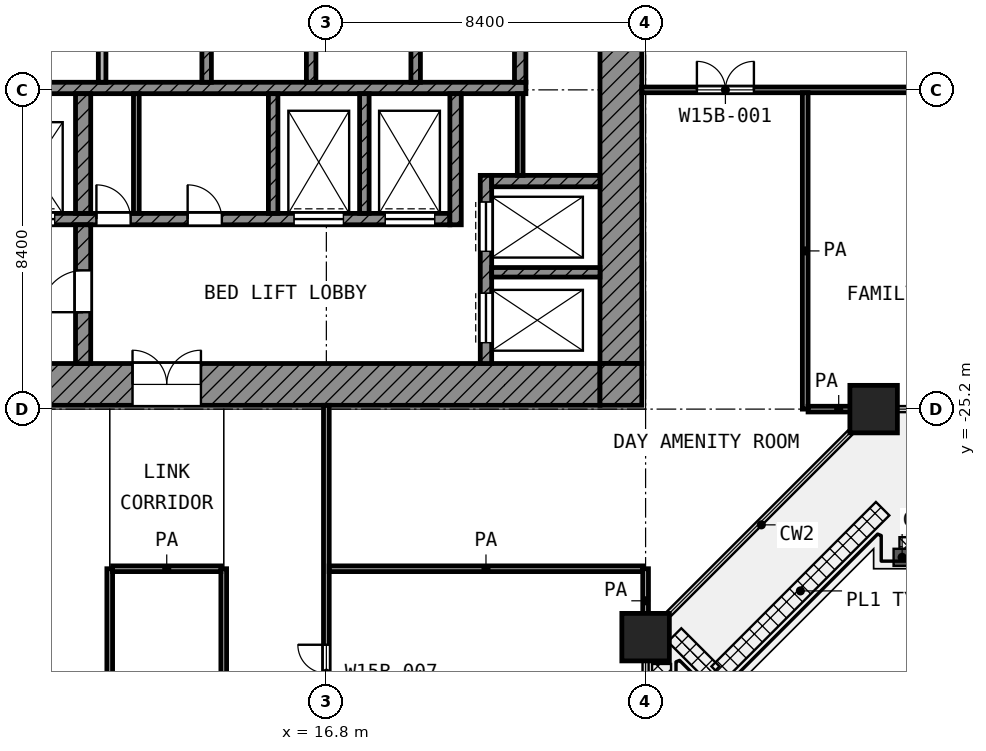
"""IFC4 building model, lengths in metres.
Left out: names, types, materials, properties, quantities, classifications, styles, units other than length and angle.
Written with IfcOpenShell. Run it as: python <this file> out.ifc"""

import sys

from ifc_helpers import new_model, si_unit, direction, frame, frame_2d, origin, origin_2d, place, context, subcontext, project, spatial, rectangle, extrude, element, fill, save


model = new_model("IFC4")
c1 = context("Model", 3, precision=1e-05, world=origin(), true_north=direction((0.0, 1.0)))
c2 = subcontext(c1, "Body", "Model", "MODEL_VIEW")
j1 = project(units=[si_unit("LENGTHUNIT", "METRE"), si_unit("PLANEANGLEUNIT", "RADIAN")], contexts=[c1])
p1 = place(None, origin())
s1 = spatial("IfcSite", under=j1, at=p1, CompositionType="ELEMENT")
p2 = place(p1, origin())
s2 = spatial("IfcBuilding", under=s1, at=p2, CompositionType="ELEMENT")
p3 = place(p2, frame((0.0, 0.0, 85.4)))
s3 = spatial("IfcBuildingStorey", under=s2, at=p3, CompositionType="ELEMENT", Elevation=85.4)
for number, where, z_axis, x_axis in (
    (1, (31.2, -25.2, 0.0), (0.0, 0.0, 1.0), (1.0, 0.0, 0.0)),
    (2, (25.2, -31.2, 0.0), (0.0, 0.0, 1.0), (1.0, 0.0, 0.0)),
):
    element("IfcColumn", number, at=place(p3, frame(where, z_axis=z_axis, x_axis=x_axis)), inside=s3, PredefinedType="COLUMN", context=c2, shape_type="SweptSolid", body=[
        extrude(rectangle(XDim=1.25, YDim=1.25, at=origin_2d()), origin(), (0.0, 0.0, 1.0), 4.2),
    ])
p4 = place(p3, frame((24.55, -24.0, 0.0), z_axis=(0.0, 0.0, 1.0), x_axis=(0.0, 1.0, 0.0)))
e3 = element("IfcWall", 3, at=p4, inside=s3, PredefinedType="SHEAR", context=c2, shape_type="SweptSolid", body=[
    extrude(rectangle(XDim=18.6, YDim=1.1, at=frame_2d((9.3, 0.0))), origin(), (0.0, 0.0, 1.0), 3.9),
])
p5 = place(p4, frame((10.5, 0.0, 0.0)))
e4 = element("IfcOpeningElement", 4, at=p5, cuts=e3, PredefinedType="OPENING", context=c2, shape_type="SweptSolid", body=[
    extrude(rectangle(XDim=1.8, YDim=2.1, at=frame_2d((0.9, 1.05))), frame((0.0, 0.56, 0.0), z_axis=(0.0, -1.0, 0.0), x_axis=(1.0, 0.0, 0.0)), (0.0, 0.0, 1.0), 1.12),
])
p6 = place(p3, frame((5.4, -24.55, 0.0), z_axis=(0.0, 0.0, 1.0), x_axis=(1.0, 0.0, 0.0)))
e5 = element("IfcWall", 5, at=p6, inside=s3, PredefinedType="SHEAR", context=c2, shape_type="SweptSolid", body=[
    extrude(rectangle(XDim=18.6, YDim=1.1, at=frame_2d((9.3, 0.0))), origin(), (0.0, 0.0, 1.0), 3.9),
])
p7 = place(p6, frame((6.3, 0.0, 0.0)))
e6 = element("IfcOpeningElement", 6, at=p7, cuts=e5, PredefinedType="OPENING", context=c2, shape_type="SweptSolid", body=[
    extrude(rectangle(XDim=1.8, YDim=2.1, at=frame_2d((0.9, 1.05))), frame((0.0, 0.56, 0.0), z_axis=(0.0, -1.0, 0.0), x_axis=(1.0, 0.0, 0.0)), (0.0, 0.0, 1.0), 1.12),
])
p8 = place(p3, frame((24.55, -25.1, 0.0), z_axis=(0.0, 0.0, 1.0), x_axis=(0.0, 1.0, 0.0)))
e7 = element("IfcWall", 7, at=p8, inside=s3, PredefinedType="SHEAR", context=c2, shape_type="SweptSolid", body=[
    extrude(rectangle(XDim=1.1, YDim=1.1, at=frame_2d((0.55, 0.0))), origin(), (0.0, 0.0, 1.0), 3.9),
])
p9 = place(p3, frame((5.4, -16.75, 0.0), z_axis=(0.0, 0.0, 1.0), x_axis=(1.0, 0.0, 0.0)))
e8 = element("IfcWall", 8, at=p9, inside=s3, PredefinedType="SHEAR", context=c2, shape_type="SweptSolid", body=[
    extrude(rectangle(XDim=16.65, YDim=0.3, at=frame_2d((8.325, 0.0))), origin(), (0.0, 0.0, 1.0), 3.9),
])
p10 = place(p3, frame((5.4, -20.2, 0.0), z_axis=(0.0, 0.0, 1.0), x_axis=(1.0, 0.0, 0.0)))
e9 = element("IfcWall", 9, at=p10, inside=s3, PredefinedType="SHEAR", context=c2, shape_type="SweptSolid", body=[
    extrude(rectangle(XDim=14.65, YDim=0.3, at=frame_2d((7.325, 0.0))), origin(), (0.0, 0.0, 1.0), 3.9),
])
p11 = place(p10, frame((10.55, 0.0, 0.0)))
e10 = element("IfcOpeningElement", 10, at=p11, cuts=e9, PredefinedType="OPENING", context=c2, shape_type="SweptSolid", body=[
    extrude(rectangle(XDim=1.3, YDim=2.1, at=frame_2d((0.65, 1.05))), frame((0.0, 0.16, 0.0), z_axis=(0.0, -1.0, 0.0), x_axis=(1.0, 0.0, 0.0)), (0.0, 0.0, 1.0), 0.32),
])
p12 = place(p10, frame((12.95, 0.0, 0.0)))
e11 = element("IfcOpeningElement", 11, at=p12, cuts=e9, PredefinedType="OPENING", context=c2, shape_type="SweptSolid", body=[
    extrude(rectangle(XDim=1.3, YDim=2.1, at=frame_2d((0.65, 1.05))), frame((0.0, 0.16, 0.0), z_axis=(0.0, -1.0, 0.0), x_axis=(1.0, 0.0, 0.0)), (0.0, 0.0, 1.0), 0.32),
])
p13 = place(p10, frame((0.55, 0.0, 0.0)))
e12 = element("IfcOpeningElement", 12, at=p13, cuts=e9, PredefinedType="OPENING", context=c2, shape_type="SweptSolid", body=[
    extrude(rectangle(XDim=1.3, YDim=2.1, at=frame_2d((0.65, 1.05))), frame((0.0, 0.16, 0.0), z_axis=(0.0, -1.0, 0.0), x_axis=(1.0, 0.0, 0.0)), (0.0, 0.0, 1.0), 0.32),
])
p14 = place(p10, frame((2.95, 0.0, 0.0)))
e13 = element("IfcOpeningElement", 13, at=p14, cuts=e9, PredefinedType="OPENING", context=c2, shape_type="SweptSolid", body=[
    extrude(rectangle(XDim=1.3, YDim=2.1, at=frame_2d((0.65, 1.05))), frame((0.0, 0.16, 0.0), z_axis=(0.0, -1.0, 0.0), x_axis=(1.0, 0.0, 0.0)), (0.0, 0.0, 1.0), 0.32),
])
p15 = place(p10, frame((5.35, 0.0, 0.0)))
e14 = element("IfcOpeningElement", 14, at=p15, cuts=e9, PredefinedType="OPENING", context=c2, shape_type="SweptSolid", body=[
    extrude(rectangle(XDim=0.9, YDim=2.1, at=frame_2d((0.45, 1.05))), frame((0.0, 0.16, 0.0), z_axis=(0.0, -1.0, 0.0), x_axis=(1.0, 0.0, 0.0)), (0.0, 0.0, 1.0), 0.32),
])
p16 = place(p10, frame((7.75, 0.0, 0.0)))
e15 = element("IfcOpeningElement", 15, at=p16, cuts=e9, PredefinedType="OPENING", context=c2, shape_type="SweptSolid", body=[
    extrude(rectangle(XDim=0.9, YDim=2.1, at=frame_2d((0.45, 1.05))), frame((0.0, 0.16, 0.0), z_axis=(0.0, -1.0, 0.0), x_axis=(1.0, 0.0, 0.0)), (0.0, 0.0, 1.0), 0.32),
])
p17 = place(p3, frame((10.4, -24.0, 0.0), z_axis=(0.0, 0.0, 1.0), x_axis=(0.0, 1.0, 0.0)))
e16 = element("IfcWall", 16, at=p17, inside=s3, PredefinedType="SHEAR", context=c2, shape_type="SweptSolid", body=[
    extrude(rectangle(XDim=3.65, YDim=0.4, at=frame_2d((1.825, 0.0))), origin(), (0.0, 0.0, 1.0), 3.9),
])
p18 = place(p17, frame((1.35, 0.0, 0.0)))
e17 = element("IfcOpeningElement", 17, at=p18, cuts=e16, PredefinedType="OPENING", context=c2, shape_type="SweptSolid", body=[
    extrude(rectangle(XDim=1.1, YDim=2.1, at=frame_2d((0.55, 1.05))), frame((0.0, 0.21, 0.0), z_axis=(0.0, -1.0, 0.0), x_axis=(1.0, 0.0, 0.0)), (0.0, 0.0, 1.0), 0.42),
])
p19 = place(p3, frame((10.4, -20.05, 0.0), z_axis=(0.0, 0.0, 1.0), x_axis=(0.0, 1.0, 0.0)))
e18 = element("IfcWall", 18, at=p19, inside=s3, PredefinedType="SHEAR", context=c2, shape_type="SweptSolid", body=[
    extrude(rectangle(XDim=3.15, YDim=0.4, at=frame_2d((1.575, 0.0))), origin(), (0.0, 0.0, 1.0), 3.9),
])
p20 = place(p3, frame((20.2, -20.35, 0.0), z_axis=(0.0, 0.0, 1.0), x_axis=(0.0, 1.0, 0.0)))
e19 = element("IfcWall", 19, at=p20, inside=s3, PredefinedType="SHEAR", context=c2, shape_type="SweptSolid", body=[
    extrude(rectangle(XDim=3.45, YDim=0.3, at=frame_2d((1.725, 0.0))), origin(), (0.0, 0.0, 1.0), 3.9),
])
p21 = place(p3, frame((21.9, -16.6, 0.0), z_axis=(0.0, 0.0, 1.0), x_axis=(0.0, 1.0, 0.0)))
e20 = element("IfcWall", 20, at=p21, inside=s3, PredefinedType="SHEAR", context=c2, shape_type="SweptSolid", body=[
    extrude(rectangle(XDim=2.35, YDim=0.3, at=frame_2d((1.175, 0.0))), origin(), (0.0, 0.0, 1.0), 3.9),
])
p22 = place(p3, frame((21.15, -19.2, 0.0), z_axis=(0.0, 0.0, 1.0), x_axis=(1.0, 0.0, 0.0)))
e21 = element("IfcWall", 21, at=p22, inside=s3, PredefinedType="SHEAR", context=c2, shape_type="SweptSolid", body=[
    extrude(rectangle(XDim=2.85, YDim=0.3, at=frame_2d((1.425, 0.0))), origin(), (0.0, 0.0, 1.0), 3.9),
])
p23 = place(p3, frame((21.0, -24.0, 0.0), z_axis=(0.0, 0.0, 1.0), x_axis=(0.0, 1.0, 0.0)))
e22 = element("IfcWall", 22, at=p23, inside=s3, PredefinedType="SHEAR", context=c2, shape_type="SweptSolid", body=[
    extrude(rectangle(XDim=4.95, YDim=0.3, at=frame_2d((2.475, 0.0))), origin(), (0.0, 0.0, 1.0), 3.9),
])
p24 = place(p23, frame((2.95, 0.0, 0.0)))
e23 = element("IfcOpeningElement", 23, at=p24, cuts=e22, PredefinedType="OPENING", context=c2, shape_type="SweptSolid", body=[
    extrude(rectangle(XDim=1.3, YDim=2.1, at=frame_2d((0.65, 1.05))), frame((0.0, 0.16, 0.0), z_axis=(0.0, -1.0, 0.0), x_axis=(1.0, 0.0, 0.0)), (0.0, 0.0, 1.0), 0.32),
])
p25 = place(p23, frame((0.55, 0.0, 0.0)))
e24 = element("IfcOpeningElement", 24, at=p25, cuts=e22, PredefinedType="OPENING", context=c2, shape_type="SweptSolid", body=[
    extrude(rectangle(XDim=1.3, YDim=2.1, at=frame_2d((0.65, 1.05))), frame((0.0, 0.16, 0.0), z_axis=(0.0, -1.0, 0.0), x_axis=(1.0, 0.0, 0.0)), (0.0, 0.0, 1.0), 0.32),
])
p26 = place(p3, frame((21.15, -21.6, 0.0), z_axis=(0.0, 0.0, 1.0), x_axis=(1.0, 0.0, 0.0)))
e25 = element("IfcWall", 25, at=p26, inside=s3, PredefinedType="SHEAR", context=c2, shape_type="SweptSolid", body=[
    extrude(rectangle(XDim=2.85, YDim=0.25, at=frame_2d((1.425, 0.0))), origin(), (0.0, 0.0, 1.0), 3.9),
])
for number, where, z_axis, x_axis in (
    (26, (15.4, -20.05, 0.0), (0.0, 0.0, 1.0), (0.0, 1.0, 0.0)),
    (27, (17.8, -20.05, 0.0), (0.0, 0.0, 1.0), (0.0, 1.0, 0.0)),
):
    element("IfcWall", number, at=place(p3, frame(where, z_axis=z_axis, x_axis=x_axis)), inside=s3, PredefinedType="SHEAR", context=c2, shape_type="SweptSolid", body=[
        extrude(rectangle(XDim=3.15, YDim=0.25, at=frame_2d((1.575, 0.0))), origin(), (0.0, 0.0, 1.0), 3.9),
    ])
p27 = place(p3, frame((10.9, -16.6, 0.0), z_axis=(0.0, 0.0, 1.0), x_axis=(0.0, 1.0, 0.0)))
e28 = element("IfcWall", 28, at=p27, inside=s3, PredefinedType="PARTITIONING", context=c2, shape_type="SweptSolid", body=[
    extrude(rectangle(XDim=2.35, YDim=0.2, at=frame_2d((1.175, 0.0))), origin(), (0.0, 0.0, 1.0), 3.9),
])
for number, where, z_axis, x_axis in (
    (29, (13.65, -16.6, 0.0), (0.0, 0.0, 1.0), (0.0, 1.0, 0.0)),
    (30, (16.4, -16.6, 0.0), (0.0, 0.0, 1.0), (0.0, 1.0, 0.0)),
    (31, (19.15, -16.6, 0.0), (0.0, 0.0, 1.0), (0.0, 1.0, 0.0)),
):
    element("IfcWall", number, at=place(p3, frame(where, z_axis=z_axis, x_axis=x_axis)), inside=s3, PredefinedType="SHEAR", context=c2, shape_type="SweptSolid", body=[
        extrude(rectangle(XDim=2.35, YDim=0.25, at=frame_2d((1.175, 0.0))), origin(), (0.0, 0.0, 1.0), 3.9),
    ])
p28 = place(p3, frame((21.9, -19.05, 0.0), z_axis=(0.0, 0.0, 1.0), x_axis=(0.0, 1.0, 0.0)))
e32 = element("IfcWall", 32, at=p28, inside=s3, PredefinedType="PARTITIONING", context=c2, shape_type="SweptSolid", body=[
    extrude(rectangle(XDim=2.15, YDim=0.15, at=frame_2d((1.075, 0.0))), origin(), (0.0, 0.0, 1.0), 3.9),
])
p29 = place(p3, frame((11.8, -20.05, 0.0), z_axis=(0.0, 0.0, 1.0), x_axis=(0.0, 1.0, 0.0)))
e33 = element("IfcWall", 33, at=p29, inside=s3, PredefinedType="PARTITIONING", context=c2, shape_type="SweptSolid", body=[
    extrude(rectangle(XDim=3.15, YDim=0.15, at=frame_2d((1.575, 0.0))), origin(), (0.0, 0.0, 1.0), 3.9),
])
p30 = place(p3, frame((11.175, -29.4, 0.0), z_axis=(0.0, 0.0, 1.0), x_axis=(1.0, 0.0, 0.0)))
e34 = element("IfcWall", 34, at=p30, inside=s3, PredefinedType="PARTITIONING", context=c2, shape_type="SweptSolid", body=[
    extrude(rectangle(XDim=2.85, YDim=0.15, at=frame_2d((1.425, 0.0))), origin(), (0.0, 0.0, 1.0), 3.9),
])
p31 = place(p3, frame((16.875, -29.4, 0.0), z_axis=(0.0, 0.0, 1.0), x_axis=(1.0, 0.0, 0.0)))
e35 = element("IfcWall", 35, at=p31, inside=s3, PredefinedType="PARTITIONING", context=c2, shape_type="SweptSolid", body=[
    extrude(rectangle(XDim=8.25, YDim=0.15, at=frame_2d((4.125, 0.0))), origin(), (0.0, 0.0, 1.0), 3.9),
])
p32 = place(p3, frame((29.475, -25.2, 0.0), z_axis=(0.0, 0.0, 1.0), x_axis=(1.0, 0.0, 0.0)))
e36 = element("IfcWall", 36, at=p32, inside=s3, PredefinedType="PARTITIONING", context=c2, shape_type="SweptSolid", body=[
    extrude(rectangle(XDim=1.612, YDim=0.15, at=frame_2d((0.806, 0.0))), origin(), (0.0, 0.0, 1.0), 3.9),
])
p33 = place(p3, frame((25.1, -16.8, 0.0), z_axis=(0.0, 0.0, 1.0), x_axis=(1.0, 0.0, 0.0)))
e37 = element("IfcWall", 37, at=p33, inside=s3, PredefinedType="PARTITIONING", context=c2, shape_type="SweptSolid", body=[
    extrude(rectangle(XDim=24.65, YDim=0.15, at=frame_2d((12.325, 0.0))), origin(), (0.0, 0.0, 1.0), 3.9),
])
p34 = place(p33, frame((1.45, 0.0, 0.0)))
e38 = element("IfcOpeningElement", 38, at=p34, cuts=e37, PredefinedType="OPENING", context=c2, shape_type="SweptSolid", body=[
    extrude(rectangle(XDim=1.5, YDim=2.1, at=frame_2d((0.75, 1.05))), frame((0.0, 0.085, 0.0), z_axis=(0.0, -1.0, 0.0), x_axis=(1.0, 0.0, 0.0)), (0.0, 0.0, 1.0), 0.17),
])
p35 = place(p33, frame((9.25, 0.0, 0.0)))
e39 = element("IfcOpeningElement", 39, at=p35, cuts=e37, PredefinedType="OPENING", context=c2, shape_type="SweptSolid", body=[
    extrude(rectangle(XDim=1.5, YDim=2.1, at=frame_2d((0.75, 1.05))), frame((0.0, 0.085, 0.0), z_axis=(0.0, -1.0, 0.0), x_axis=(1.0, 0.0, 0.0)), (0.0, 0.0, 1.0), 0.17),
])
p36 = place(p33, frame((15.0, 0.0, 0.0)))
e40 = element("IfcOpeningElement", 40, at=p36, cuts=e37, PredefinedType="OPENING", context=c2, shape_type="SweptSolid", body=[
    extrude(rectangle(XDim=1.2, YDim=2.1, at=frame_2d((0.6, 1.05))), frame((0.0, 0.085, 0.0), z_axis=(0.0, -1.0, 0.0), x_axis=(1.0, 0.0, 0.0)), (0.0, 0.0, 1.0), 0.17),
])
p37 = place(p33, frame((22.967, 0.0, 0.0)))
e41 = element("IfcOpeningElement", 41, at=p37, cuts=e37, PredefinedType="OPENING", context=c2, shape_type="SweptSolid", body=[
    extrude(rectangle(XDim=1.2, YDim=2.1, at=frame_2d((0.6, 1.05))), frame((0.0, 0.085, 0.0), z_axis=(0.0, -1.0, 0.0), x_axis=(1.0, 0.0, 0.0)), (0.0, 0.0, 1.0), 0.17),
])
p38 = place(p33, frame((17.6, 0.0, 0.0)))
e42 = element("IfcOpeningElement", 42, at=p38, cuts=e37, PredefinedType="OPENING", context=c2, shape_type="SweptSolid", body=[
    extrude(rectangle(XDim=1.2, YDim=2.1, at=frame_2d((0.6, 1.05))), frame((0.0, 0.085, 0.0), z_axis=(0.0, -1.0, 0.0), x_axis=(1.0, 0.0, 0.0)), (0.0, 0.0, 1.0), 0.17),
])
p39 = place(p3, frame((11.1, -68.7, 0.0), z_axis=(0.0, 0.0, 1.0), x_axis=(0.0, 1.0, 0.0)))
e43 = element("IfcWall", 43, at=p39, inside=s3, PredefinedType="PARTITIONING", context=c2, shape_type="SweptSolid", body=[
    extrude(rectangle(XDim=39.3, YDim=0.15, at=frame_2d((19.65, 0.0))), origin(), (0.0, 0.0, 1.0), 3.9),
])
p40 = place(p39, frame((34.6, 0.0, 0.0)))
e44 = element("IfcOpeningElement", 44, at=p40, cuts=e43, PredefinedType="OPENING", context=c2, shape_type="SweptSolid", body=[
    extrude(rectangle(XDim=1.0, YDim=2.1, at=frame_2d((0.5, 1.05))), frame((0.0, 0.085, 0.0), z_axis=(0.0, -1.0, 0.0), x_axis=(1.0, 0.0, 0.0)), (0.0, 0.0, 1.0), 0.17),
])
p41 = place(p39, frame((25.9, 0.0, 0.0)))
e45 = element("IfcOpeningElement", 45, at=p41, cuts=e43, PredefinedType="OPENING", context=c2, shape_type="SweptSolid", body=[
    extrude(rectangle(XDim=1.0, YDim=2.1, at=frame_2d((0.5, 1.05))), frame((0.0, 0.085, 0.0), z_axis=(0.0, -1.0, 0.0), x_axis=(1.0, 0.0, 0.0)), (0.0, 0.0, 1.0), 0.17),
])
p42 = place(p39, frame((2.2, 0.0, 0.0)))
e46 = element("IfcOpeningElement", 46, at=p42, cuts=e43, PredefinedType="OPENING", context=c2, shape_type="SweptSolid", body=[
    extrude(rectangle(XDim=1.0, YDim=2.1, at=frame_2d((0.5, 1.05))), frame((0.0, 0.085, 0.0), z_axis=(0.0, -1.0, 0.0), x_axis=(1.0, 0.0, 0.0)), (0.0, 0.0, 1.0), 0.17),
])
p43 = place(p3, frame((14.1, -68.7, 0.0), z_axis=(0.0, 0.0, 1.0), x_axis=(0.0, 1.0, 0.0)))
e47 = element("IfcWall", 47, at=p43, inside=s3, PredefinedType="PARTITIONING", context=c2, shape_type="SweptSolid", body=[
    extrude(rectangle(XDim=39.3, YDim=0.15, at=frame_2d((19.65, 0.0))), origin(), (0.0, 0.0, 1.0), 3.9),
])
p44 = place(p43, frame((13.15, 0.0, 0.0)))
e48 = element("IfcOpeningElement", 48, at=p44, cuts=e47, PredefinedType="OPENING", context=c2, shape_type="SweptSolid", body=[
    extrude(rectangle(XDim=1.0, YDim=2.1, at=frame_2d((0.5, 1.05))), frame((0.0, 0.085, 0.0), z_axis=(0.0, -1.0, 0.0), x_axis=(1.0, 0.0, 0.0)), (0.0, 0.0, 1.0), 0.17),
])
p45 = place(p3, frame((16.8, -50.398, 0.0), z_axis=(0.0, 0.0, 1.0), x_axis=(0.0, 1.0, 0.0)))
e49 = element("IfcWall", 49, at=p45, inside=s3, PredefinedType="PARTITIONING", context=c2, shape_type="SweptSolid", body=[
    extrude(rectangle(XDim=25.298, YDim=0.15, at=frame_2d((12.649, 0.0))), origin(), (0.0, 0.0, 1.0), 3.9),
])
p46 = place(p45, frame((17.498, 0.0, 0.0)))
e50 = element("IfcOpeningElement", 50, at=p46, cuts=e49, PredefinedType="OPENING", context=c2, shape_type="SweptSolid", body=[
    extrude(rectangle(XDim=1.5, YDim=2.1, at=frame_2d((0.75, 1.05))), frame((0.0, 0.085, 0.0), z_axis=(0.0, -1.0, 0.0), x_axis=(1.0, 0.0, 0.0)), (0.0, 0.0, 1.0), 0.17),
])
p47 = place(p45, frame((9.398, 0.0, 0.0)))
e51 = element("IfcOpeningElement", 51, at=p47, cuts=e49, PredefinedType="OPENING", context=c2, shape_type="SweptSolid", body=[
    extrude(rectangle(XDim=1.2, YDim=2.1, at=frame_2d((0.6, 1.05))), frame((0.0, 0.085, 0.0), z_axis=(0.0, -1.0, 0.0), x_axis=(1.0, 0.0, 0.0)), (0.0, 0.0, 1.0), 0.17),
])
p48 = place(p45, frame((6.498, 0.0, 0.0)))
e52 = element("IfcOpeningElement", 52, at=p48, cuts=e49, PredefinedType="OPENING", context=c2, shape_type="SweptSolid", body=[
    extrude(rectangle(XDim=1.2, YDim=2.1, at=frame_2d((0.6, 1.05))), frame((0.0, 0.085, 0.0), z_axis=(0.0, -1.0, 0.0), x_axis=(1.0, 0.0, 0.0)), (0.0, 0.0, 1.0), 0.17),
])
p49 = place(p45, frame((0.698, 0.0, 0.0)))
e53 = element("IfcOpeningElement", 53, at=p49, cuts=e49, PredefinedType="OPENING", context=c2, shape_type="SweptSolid", body=[
    extrude(rectangle(XDim=0.9, YDim=2.1, at=frame_2d((0.45, 1.05))), frame((0.0, 0.085, 0.0), z_axis=(0.0, -1.0, 0.0), x_axis=(1.0, 0.0, 0.0)), (0.0, 0.0, 1.0), 0.17),
])
p50 = place(p3, frame((25.2, -31.087, 0.0), z_axis=(0.0, 0.0, 1.0), x_axis=(0.0, 1.0, 0.0)))
e54 = element("IfcWall", 54, at=p50, inside=s3, PredefinedType="PARTITIONING", context=c2, shape_type="SweptSolid", body=[
    extrude(rectangle(XDim=1.687, YDim=0.15, at=frame_2d((0.844, 0.0))), origin(), (0.0, 0.0, 1.0), 3.9),
])
p51 = place(p3, frame((29.4, -25.2, 0.0), z_axis=(0.0, 0.0, 1.0), x_axis=(0.0, 1.0, 0.0)))
e55 = element("IfcWall", 55, at=p51, inside=s3, PredefinedType="PARTITIONING", context=c2, shape_type="SweptSolid", body=[
    extrude(rectangle(XDim=8.325, YDim=0.15, at=frame_2d((4.163, 0.0))), origin(), (0.0, 0.0, 1.0), 3.9),
])
p52 = place(p24, origin())
e56 = element("IfcDoor", 56, at=p52, inside=s3, OperationType="DOUBLE_DOOR_SLIDING", PredefinedType="DOOR", context=c2, shape_type="SweptSolid", body=[
    extrude(rectangle(XDim=1.3, YDim=2.1, at=frame_2d((0.65, 1.05))), frame((0.0, 0.025, 0.0), z_axis=(0.0, -1.0, 0.0), x_axis=(1.0, 0.0, 0.0)), (0.0, 0.0, 1.0), 0.05),
])
fill(e23, e56)
p53 = place(p25, origin())
e57 = element("IfcDoor", 57, at=p53, inside=s3, OperationType="DOUBLE_DOOR_SLIDING", PredefinedType="DOOR", context=c2, shape_type="SweptSolid", body=[
    extrude(rectangle(XDim=1.3, YDim=2.1, at=frame_2d((0.65, 1.05))), frame((0.0, 0.025, 0.0), z_axis=(0.0, -1.0, 0.0), x_axis=(1.0, 0.0, 0.0)), (0.0, 0.0, 1.0), 0.05),
])
fill(e24, e57)
p54 = place(p11, origin())
e58 = element("IfcDoor", 58, at=p54, inside=s3, OperationType="DOUBLE_DOOR_SLIDING", PredefinedType="DOOR", context=c2, shape_type="SweptSolid", body=[
    extrude(rectangle(XDim=1.3, YDim=2.1, at=frame_2d((0.65, 1.05))), frame((0.0, 0.025, 0.0), z_axis=(0.0, -1.0, 0.0), x_axis=(1.0, 0.0, 0.0)), (0.0, 0.0, 1.0), 0.05),
])
fill(e10, e58)
p55 = place(p12, origin())
e59 = element("IfcDoor", 59, at=p55, inside=s3, OperationType="DOUBLE_DOOR_SLIDING", PredefinedType="DOOR", context=c2, shape_type="SweptSolid", body=[
    extrude(rectangle(XDim=1.3, YDim=2.1, at=frame_2d((0.65, 1.05))), frame((0.0, 0.025, 0.0), z_axis=(0.0, -1.0, 0.0), x_axis=(1.0, 0.0, 0.0)), (0.0, 0.0, 1.0), 0.05),
])
fill(e11, e59)
p56 = place(p14, origin())
e60 = element("IfcDoor", 60, at=p56, inside=s3, OperationType="DOUBLE_DOOR_SLIDING", PredefinedType="DOOR", context=c2, shape_type="SweptSolid", body=[
    extrude(rectangle(XDim=1.3, YDim=2.1, at=frame_2d((0.65, 1.05))), frame((0.0, 0.025, 0.0), z_axis=(0.0, -1.0, 0.0), x_axis=(1.0, 0.0, 0.0)), (0.0, 0.0, 1.0), 0.05),
])
fill(e13, e60)
p57 = place(p18, origin())
e61 = element("IfcDoor", 61, at=p57, inside=s3, OperationType="SINGLE_SWING_LEFT", PredefinedType="DOOR", context=c2, shape_type="SweptSolid", body=[
    extrude(rectangle(XDim=1.1, YDim=2.1, at=frame_2d((0.55, 1.05))), frame((0.0, 0.025, 0.0), z_axis=(0.0, -1.0, 0.0), x_axis=(1.0, 0.0, 0.0)), (0.0, 0.0, 1.0), 0.05),
])
fill(e17, e61)
p58 = place(p7, origin())
e62 = element("IfcDoor", 62, at=p58, inside=s3, OperationType="DOUBLE_DOOR_SINGLE_SWING", PredefinedType="DOOR", context=c2, shape_type="SweptSolid", body=[
    extrude(rectangle(XDim=1.8, YDim=2.1, at=frame_2d((0.9, 1.05))), frame((0.0, 0.025, 0.0), z_axis=(0.0, -1.0, 0.0), x_axis=(1.0, 0.0, 0.0)), (0.0, 0.0, 1.0), 0.05),
])
fill(e6, e62)
p59 = place(p15, origin())
e63 = element("IfcDoor", 63, at=p59, inside=s3, OperationType="SINGLE_SWING_LEFT", PredefinedType="DOOR", context=c2, shape_type="SweptSolid", body=[
    extrude(rectangle(XDim=0.9, YDim=2.1, at=frame_2d((0.45, 1.05))), frame((0.0, 0.025, 0.0), z_axis=(0.0, -1.0, 0.0), x_axis=(1.0, 0.0, 0.0)), (0.0, 0.0, 1.0), 0.05),
])
fill(e14, e63)
p60 = place(p16, origin())
e64 = element("IfcDoor", 64, at=p60, inside=s3, OperationType="SINGLE_SWING_LEFT", PredefinedType="DOOR", context=c2, shape_type="SweptSolid", body=[
    extrude(rectangle(XDim=0.9, YDim=2.1, at=frame_2d((0.45, 1.05))), frame((0.0, 0.025, 0.0), z_axis=(0.0, -1.0, 0.0), x_axis=(1.0, 0.0, 0.0)), (0.0, 0.0, 1.0), 0.05),
])
fill(e15, e64)
p61 = place(p34, origin())
e65 = element("IfcDoor", 65, at=p61, inside=s3, OperationType="DOUBLE_DOOR_SINGLE_SWING", PredefinedType="DOOR", context=c2, shape_type="SweptSolid", body=[
    extrude(rectangle(XDim=1.5, YDim=2.1, at=frame_2d((0.75, 1.05))), frame((0.0, 0.025, 0.0), z_axis=(0.0, -1.0, 0.0), x_axis=(1.0, 0.0, 0.0)), (0.0, 0.0, 1.0), 0.05),
])
fill(e38, e65)
p62 = place(p46, origin())
e66 = element("IfcDoor", 66, at=p62, inside=s3, OperationType="DOUBLE_DOOR_SINGLE_SWING", PredefinedType="DOOR", context=c2, shape_type="SweptSolid", body=[
    extrude(rectangle(XDim=1.5, YDim=2.1, at=frame_2d((0.75, 1.05))), frame((0.0, 0.025, 0.0), z_axis=(0.0, -1.0, 0.0), x_axis=(1.0, 0.0, 0.0)), (0.0, 0.0, 1.0), 0.05),
])
fill(e50, e66)
save(model, sys.argv[1])
